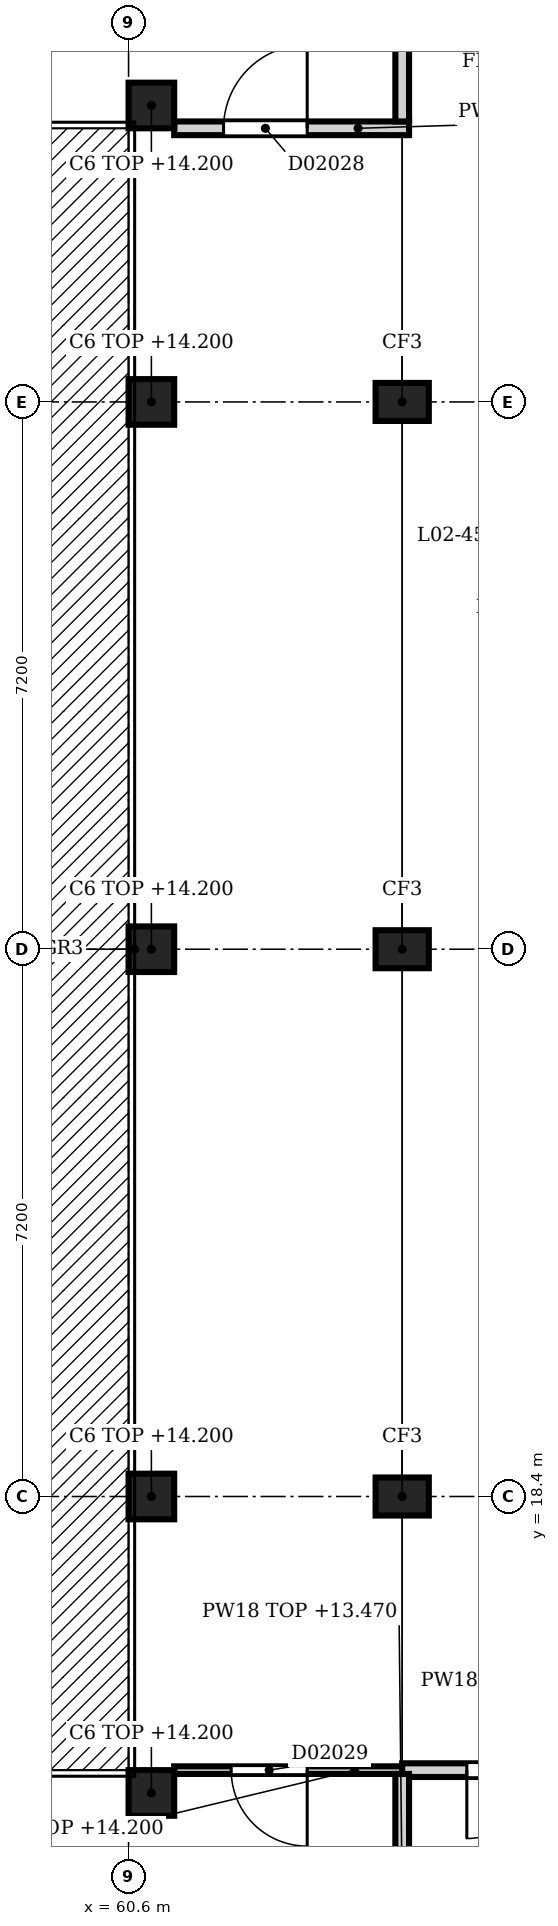
"""IFC4 building model, lengths in metres.
Left out: names, types, materials, properties, quantities, classifications, styles, units other than length and angle.
Written with IfcOpenShell. Run it as: python <this file> out.ifc"""

import sys

from ifc_helpers import new_model, si_unit, direction, frame, frame_2d, origin, origin_2d, place, context, subcontext, project, spatial, rectangle, extrude, element, fill, save


model = new_model("IFC4")
c1 = context("Model", 3, precision=1e-05, world=origin(), true_north=direction((0.0, 1.0)))
c2 = subcontext(c1, "Body", "Model", "MODEL_VIEW")
j1 = project(units=[si_unit("LENGTHUNIT", "METRE"), si_unit("PLANEANGLEUNIT", "RADIAN")], contexts=[c1])
p1 = place(None, origin())
s1 = spatial("IfcSite", under=j1, at=p1, CompositionType="ELEMENT")
p2 = place(p1, origin())
s2 = spatial("IfcBuilding", under=s1, at=p2, CompositionType="ELEMENT")
p3 = place(p2, frame((0.0, 0.0, 9.9)))
s3 = spatial("IfcBuildingStorey", under=s2, at=p3, CompositionType="ELEMENT", Elevation=9.9)
for number, where, z_axis, x_axis in (
    (1, (64.2, 18.4, 0.0), (0.0, 0.0, 1.0), (1.0, 0.0, 0.0)),
    (2, (64.2, 25.6, 0.0), (0.0, 0.0, 1.0), (1.0, 0.0, 0.0)),
    (3, (64.2, 32.8, 0.0), (0.0, 0.0, 1.0), (1.0, 0.0, 0.0)),
):
    element("IfcColumn", number, at=place(p3, frame(where, z_axis=z_axis, x_axis=x_axis)), inside=s3, PredefinedType="COLUMN", context=c2, shape_type="SweptSolid", body=[
        extrude(rectangle(XDim=0.7, YDim=0.5, at=origin_2d()), origin(), (0.0, 0.0, 1.0), 4.5),
    ])
for number, where, z_axis, x_axis in (
    (4, (60.9, 14.5, 0.0), (0.0, 0.0, 1.0), (1.0, 0.0, 0.0)),
    (5, (60.9, 18.4, 0.0), (0.0, 0.0, 1.0), (1.0, 0.0, 0.0)),
    (6, (60.9, 25.6, 0.0), (0.0, 0.0, 1.0), (1.0, 0.0, 0.0)),
    (7, (60.9, 32.8, 0.0), (0.0, 0.0, 1.0), (1.0, 0.0, 0.0)),
    (8, (60.9, 36.7, 0.0), (0.0, 0.0, 1.0), (1.0, 0.0, 0.0)),
):
    element("IfcColumn", number, at=place(p3, frame(where, z_axis=z_axis, x_axis=x_axis)), inside=s3, PredefinedType="COLUMN", context=c2, shape_type="SweptSolid", body=[
        extrude(rectangle(XDim=0.6, YDim=0.6, at=origin_2d()), origin(), (0.0, 0.0, 1.0), 4.3),
    ])
p4 = place(p3, frame((64.2, 14.8, 0.0), z_axis=(0.0, 0.0, 1.0), x_axis=(-1.0, 0.0, 0.0)))
e9 = element("IfcWall", 9, at=p4, inside=s3, PredefinedType="PARTITIONING", context=c2, shape_type="SweptSolid", body=[
    extrude(rectangle(XDim=3.0, YDim=0.1, at=frame_2d((1.5, 0.0))), origin(), (0.0, 0.0, 1.0), 4.3),
])
p5 = place(p4, frame((1.25, 0.0, 0.0)))
e10 = element("IfcOpeningElement", 10, at=p5, cuts=e9, PredefinedType="OPENING", context=c2, shape_type="SweptSolid", body=[
    extrude(rectangle(XDim=1.0, YDim=2.1, at=frame_2d((0.5, 1.05))), frame((0.0, 0.06, 0.0), z_axis=(0.0, -1.0, 0.0), x_axis=(1.0, 0.0, 0.0)), (0.0, 0.0, 1.0), 0.12),
])
p6 = place(p3, frame((64.2, 14.8, 0.0), z_axis=(0.0, 0.0, 1.0), x_axis=(1.0, 0.0, 0.0)))
e11 = element("IfcWall", 11, at=p6, inside=s3, PredefinedType="PARTITIONING", context=c2, shape_type="SweptSolid", body=[
    extrude(rectangle(XDim=3.6, YDim=0.18, at=frame_2d((1.8, 0.0))), origin(), (0.0, 0.0, 1.0), 4.3),
])
p7 = place(p6, frame((0.85, 0.0, 0.0)))
e12 = element("IfcOpeningElement", 12, at=p7, cuts=e11, PredefinedType="OPENING", context=c2, shape_type="SweptSolid", body=[
    extrude(rectangle(XDim=1.8, YDim=2.3, at=frame_2d((0.9, 1.15))), frame((0.0, 0.1, 0.0), z_axis=(0.0, -1.0, 0.0), x_axis=(1.0, 0.0, 0.0)), (0.0, 0.0, 1.0), 0.2),
])
p8 = place(p3, frame((61.2, 36.4, 0.0), z_axis=(0.0, 0.0, 1.0), x_axis=(1.0, 0.0, 0.0)))
e13 = element("IfcWall", 13, at=p8, inside=s3, PredefinedType="PARTITIONING", context=c2, shape_type="SweptSolid", body=[
    extrude(rectangle(XDim=3.09, YDim=0.18, at=frame_2d((1.545, 0.0))), origin(), (0.0, 0.0, 1.0), 4.3),
])
p9 = place(p8, frame((0.65, 0.0, 0.0)))
e14 = element("IfcOpeningElement", 14, at=p9, cuts=e13, PredefinedType="OPENING", context=c2, shape_type="SweptSolid", body=[
    extrude(rectangle(XDim=1.1, YDim=2.3, at=frame_2d((0.55, 1.15))), frame((0.0, 0.1, 0.0), z_axis=(0.0, -1.0, 0.0), x_axis=(1.0, 0.0, 0.0)), (0.0, 0.0, 1.0), 0.2),
])
p10 = place(p3, frame((64.2, 11.4, 0.0), z_axis=(0.0, 0.0, 1.0), x_axis=(0.0, 1.0, 0.0)))
e15 = element("IfcWall", 15, at=p10, inside=s3, PredefinedType="PARTITIONING", context=c2, shape_type="SweptSolid", body=[
    extrude(rectangle(XDim=3.35, YDim=0.18, at=frame_2d((1.675, 0.0))), origin(), (0.0, 0.0, 1.0), 3.57),
])
p11 = place(p3, frame((64.2, 36.49, 0.0), z_axis=(0.0, 0.0, 1.0), x_axis=(0.0, 1.0, 0.0)))
e16 = element("IfcWall", 16, at=p11, inside=s3, PredefinedType="PARTITIONING", context=c2, shape_type="SweptSolid", body=[
    extrude(rectangle(XDim=3.31, YDim=0.18, at=frame_2d((1.655, 0.0))), origin(), (0.0, 0.0, 1.0), 3.57),
])
p12 = place(p5, origin())
e17 = element("IfcDoor", 17, at=p12, inside=s3, OperationType="SINGLE_SWING_RIGHT", PredefinedType="DOOR", context=c2, shape_type="SweptSolid", body=[
    extrude(rectangle(XDim=1.0, YDim=2.1, at=frame_2d((0.5, 1.05))), frame((0.0, 0.025, 0.0), z_axis=(0.0, -1.0, 0.0), x_axis=(1.0, 0.0, 0.0)), (0.0, 0.0, 1.0), 0.05),
])
fill(e10, e17)
p13 = place(p7, origin())
e18 = element("IfcDoor", 18, at=p13, inside=s3, OperationType="SINGLE_SWING_LEFT", PredefinedType="DOOR", context=c2, shape_type="SweptSolid", body=[
    extrude(rectangle(XDim=1.8, YDim=2.3, at=frame_2d((0.9, 1.15))), frame((0.0, 0.025, 0.0), z_axis=(0.0, -1.0, 0.0), x_axis=(1.0, 0.0, 0.0)), (0.0, 0.0, 1.0), 0.05),
])
fill(e12, e18)
p14 = place(p9, origin())
e19 = element("IfcDoor", 19, at=p14, inside=s3, OperationType="SINGLE_SWING_LEFT", PredefinedType="DOOR", context=c2, shape_type="SweptSolid", body=[
    extrude(rectangle(XDim=1.1, YDim=2.3, at=frame_2d((0.55, 1.15))), frame((0.0, 0.025, 0.0), z_axis=(0.0, -1.0, 0.0), x_axis=(1.0, 0.0, 0.0)), (0.0, 0.0, 1.0), 0.05),
])
fill(e14, e19)
save(model, sys.argv[1])
